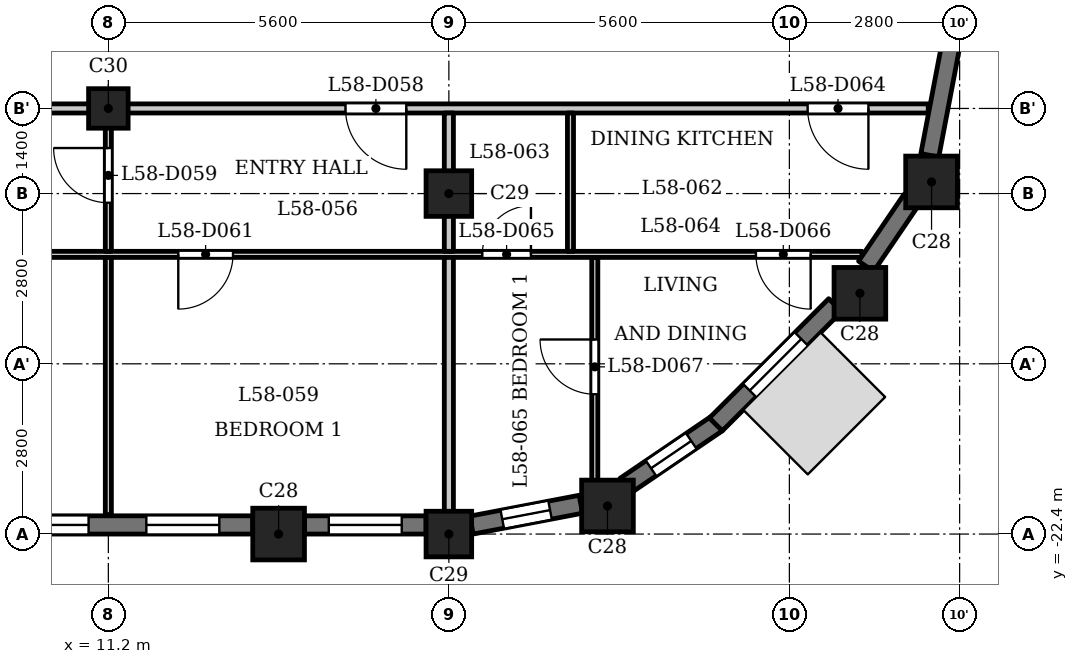
"""IFC4 building model, lengths in metres.
Left out: names, types, materials, properties, quantities, classifications, styles, units other than length and angle.
Written with IfcOpenShell. Run it as: python <this file> out.ifc"""

import sys

from ifc_helpers import new_model, si_unit, direction, frame, frame_2d, origin, origin_2d, place, context, subcontext, project, spatial, rectangle, extrude, element, fill, save


model = new_model("IFC4")
c1 = context("Model", 3, precision=1e-05, world=origin(), true_north=direction((0.0, 1.0)))
c2 = subcontext(c1, "Body", "Model", "MODEL_VIEW")
j1 = project(units=[si_unit("LENGTHUNIT", "METRE"), si_unit("PLANEANGLEUNIT", "RADIAN")], contexts=[c1])
p1 = place(None, origin())
s1 = spatial("IfcSite", under=j1, at=p1, CompositionType="ELEMENT")
p2 = place(p1, origin())
s2 = spatial("IfcBuilding", under=s1, at=p2, CompositionType="ELEMENT")
p3 = place(p2, frame((0.0, 0.0, 223.9)))
s3 = spatial("IfcBuildingStorey", under=s2, at=p3, CompositionType="ELEMENT", Elevation=223.9)
for number, where, z_axis, x_axis in (
    (1, (14.0, -22.4, 0.0), (0.0, 0.0, 1.0), (1.0, 0.0, 0.0)),
    (2, (19.409, -21.938, 0.0), (0.0, 0.0, 1.0), (1.0, 0.0, 0.0)),
    (3, (23.56, -18.44, 0.0), (0.0, 0.0, 1.0), (1.0, 0.0, 0.0)),
    (4, (24.738, -16.609, 0.0), (0.0, 0.0, 1.0), (1.0, 0.0, 0.0)),
):
    element("IfcColumn", number, at=place(p3, frame(where, z_axis=z_axis, x_axis=x_axis)), inside=s3, PredefinedType="COLUMN", context=c2, shape_type="SweptSolid", body=[
        extrude(rectangle(XDim=0.85, YDim=0.85, at=origin_2d()), origin(), (0.0, 0.0, 1.0), 3.5),
    ])
for number, where, z_axis, x_axis in (
    (5, (16.8, -22.4, 0.0), (0.0, 0.0, 1.0), (1.0, 0.0, 0.0)),
    (6, (16.8, -16.8, 0.0), (0.0, 0.0, 1.0), (1.0, 0.0, 0.0)),
):
    element("IfcColumn", number, at=place(p3, frame(where, z_axis=z_axis, x_axis=x_axis)), inside=s3, PredefinedType="COLUMN", context=c2, shape_type="SweptSolid", body=[
        extrude(rectangle(XDim=0.75, YDim=0.75, at=origin_2d()), origin(), (0.0, 0.0, 1.0), 3.5),
    ])
p4 = place(p3, frame((11.2, -15.4, 0.0), z_axis=(0.0, 0.0, 1.0), x_axis=(1.0, 0.0, 0.0)))
e7 = element("IfcColumn", 7, at=p4, inside=s3, PredefinedType="COLUMN", context=c2, shape_type="SweptSolid", body=[
    extrude(rectangle(XDim=0.65, YDim=0.65, at=origin_2d()), origin(), (0.0, 0.0, 1.0), 3.5),
])
p5 = place(p3, frame((8.825, -22.25, 0.0), z_axis=(0.0, 0.0, 1.0), x_axis=(1.0, 0.0, 0.0)))
e8 = element("IfcWall", 8, at=p5, inside=s3, PredefinedType="SOLIDWALL", context=c2, shape_type="SweptSolid", body=[
    extrude(rectangle(XDim=4.75, YDim=0.3, at=frame_2d((2.375, 0.0))), origin(), (0.0, 0.0, 1.0), 2.5),
])
p6 = place(p5, frame((0.25, 0.0, 0.9)))
e9 = element("IfcOpeningElement", 9, at=p6, cuts=e8, PredefinedType="OPENING", context=c2, shape_type="SweptSolid", body=[
    extrude(rectangle(XDim=1.8, YDim=1.25, at=frame_2d((0.9, 0.625))), frame((0.0, 0.16, 0.0), z_axis=(0.0, -1.0, 0.0), x_axis=(1.0, 0.0, 0.0)), (0.0, 0.0, 1.0), 0.32),
])
p7 = place(p5, frame((3.0, 0.0, 0.6)))
e10 = element("IfcOpeningElement", 10, at=p7, cuts=e8, PredefinedType="OPENING", context=c2, shape_type="SweptSolid", body=[
    extrude(rectangle(XDim=1.2, YDim=1.55, at=frame_2d((0.6, 0.775))), frame((0.0, 0.16, 0.0), z_axis=(0.0, -1.0, 0.0), x_axis=(1.0, 0.0, 0.0)), (0.0, 0.0, 1.0), 0.32),
])
p8 = place(p3, frame((14.425, -22.25, 0.0), z_axis=(0.0, 0.0, 1.0), x_axis=(1.0, 0.0, 0.0)))
e11 = element("IfcWall", 11, at=p8, inside=s3, PredefinedType="SOLIDWALL", context=c2, shape_type="SweptSolid", body=[
    extrude(rectangle(XDim=2.0, YDim=0.3, at=frame_2d((1.0, 0.0))), origin(), (0.0, 0.0, 1.0), 2.5),
])
p9 = place(p8, frame((0.4, 0.0, 0.6)))
e12 = element("IfcOpeningElement", 12, at=p9, cuts=e11, PredefinedType="OPENING", context=c2, shape_type="SweptSolid", body=[
    extrude(rectangle(XDim=1.2, YDim=1.55, at=frame_2d((0.6, 0.775))), frame((0.0, 0.16, 0.0), z_axis=(0.0, -1.0, 0.0), x_axis=(1.0, 0.0, 0.0)), (0.0, 0.0, 1.0), 0.32),
])
p10 = place(p3, frame((17.172, -22.253, 0.0), z_axis=(0.0, 0.0, 1.0), x_axis=(0.982300037503, 0.187314271538, 0.0)))
e13 = element("IfcWall", 13, at=p10, inside=s3, PredefinedType="SOLIDWALL", context=c2, shape_type="SweptSolid", body=[
    extrude(rectangle(XDim=1.831, YDim=0.3, at=frame_2d((0.916, 0.0))), origin(), (0.0, 0.0, 1.0), 2.5),
])
p11 = place(p10, frame((0.516, 0.0, 0.6)))
e14 = element("IfcOpeningElement", 14, at=p11, cuts=e13, PredefinedType="OPENING", context=c2, shape_type="SweptSolid", body=[
    extrude(rectangle(XDim=0.8, YDim=1.55, at=frame_2d((0.4, 0.775))), frame((0.0, 0.16, 0.0), z_axis=(0.0, -1.0, 0.0), x_axis=(1.0, 0.0, 0.0)), (0.0, 0.0, 1.0), 0.32),
])
p12 = place(p3, frame((19.698, -21.608, 0.0), z_axis=(0.0, 0.0, 1.0), x_axis=(0.82705295608, 0.562124014644, 0.0)))
e15 = element("IfcWall", 15, at=p12, inside=s3, PredefinedType="SOLIDWALL", context=c2, shape_type="SweptSolid", body=[
    extrude(rectangle(XDim=1.831, YDim=0.3, at=frame_2d((0.916, 0.0))), origin(), (0.0, 0.0, 1.0), 2.5),
])
p13 = place(p12, frame((0.516, 0.0, 0.6)))
e16 = element("IfcOpeningElement", 16, at=p13, cuts=e15, PredefinedType="OPENING", context=c2, shape_type="SweptSolid", body=[
    extrude(rectangle(XDim=0.8, YDim=1.55, at=frame_2d((0.4, 0.775))), frame((0.0, 0.16, 0.0), z_axis=(0.0, -1.0, 0.0), x_axis=(1.0, 0.0, 0.0)), (0.0, 0.0, 1.0), 0.32),
])
p14 = place(p3, frame((21.191, -20.597, 0.0), z_axis=(0.0, 0.0, 1.0), x_axis=(0.707150767798, 0.707062791838, 0.0)))
e17 = element("IfcWall", 17, at=p14, inside=s3, PredefinedType="SOLIDWALL", context=c2, shape_type="SweptSolid", body=[
    extrude(rectangle(XDim=2.775, YDim=0.3, at=frame_2d((1.388, 0.0))), origin(), (0.0, 0.0, 1.0), 2.5),
])
p15 = place(p14, frame((0.788, 0.0, 0.6)))
e18 = element("IfcOpeningElement", 18, at=p15, cuts=e17, PredefinedType="OPENING", context=c2, shape_type="SweptSolid", body=[
    extrude(rectangle(XDim=1.2, YDim=1.55, at=frame_2d((0.6, 0.775))), frame((0.0, 0.16, 0.0), z_axis=(0.0, -1.0, 0.0), x_axis=(1.0, 0.0, 0.0)), (0.0, 0.0, 1.0), 0.32),
])
p16 = place(p3, frame((23.662, -17.996, 0.0), z_axis=(0.0, 0.0, 1.0), x_axis=(0.562149004813, 0.827035970432, 0.0)))
e19 = element("IfcWall", 19, at=p16, inside=s3, PredefinedType="SOLIDWALL", context=c2, shape_type="SweptSolid", body=[
    extrude(rectangle(XDim=1.327, YDim=0.3, at=frame_2d((0.664, 0.0))), origin(), (0.0, 0.0, 1.0), 2.5),
])
p17 = place(p3, frame((24.709, -16.171, 0.0), z_axis=(0.0, 0.0, 1.0), x_axis=(0.187442908742, 0.982275499014, 0.0)))
e20 = element("IfcWall", 20, at=p17, inside=s3, PredefinedType="SOLIDWALL", context=c2, shape_type="SweptSolid", body=[
    extrude(rectangle(XDim=1.831, YDim=0.3, at=frame_2d((0.916, 0.0))), origin(), (0.0, 0.0, 1.0), 2.5),
])
p18 = place(p3, frame((-23.594, -17.8, 0.0), z_axis=(0.0, 0.0, 1.0), x_axis=(1.0, 0.0, 0.0)))
e21 = element("IfcWall", 21, at=p18, inside=s3, PredefinedType="PARTITIONING", context=c2, shape_type="SweptSolid", body=[
    extrude(rectangle(XDim=47.188, YDim=0.1, at=frame_2d((23.594, 0.0))), origin(), (0.0, 0.0, 1.0), 3.2),
])
p19 = place(p18, frame((5.094, 0.0, 0.0)))
e22 = element("IfcOpeningElement", 22, at=p19, cuts=e21, PredefinedType="OPENING", context=c2, shape_type="SweptSolid", body=[
    extrude(rectangle(XDim=0.8, YDim=2.1, at=frame_2d((0.4, 1.05))), frame((0.0, 0.06, 0.0), z_axis=(0.0, -1.0, 0.0), x_axis=(1.0, 0.0, 0.0)), (0.0, 0.0, 1.0), 0.12),
])
p20 = place(p18, frame((1.126, 0.0, 0.0)))
e23 = element("IfcOpeningElement", 23, at=p20, cuts=e21, PredefinedType="OPENING", context=c2, shape_type="SweptSolid", body=[
    extrude(rectangle(XDim=0.9, YDim=2.1, at=frame_2d((0.45, 1.05))), frame((0.0, 0.06, 0.0), z_axis=(0.0, -1.0, 0.0), x_axis=(1.0, 0.0, 0.0)), (0.0, 0.0, 1.0), 0.12),
])
p21 = place(p18, frame((9.944, 0.0, 0.0)))
e24 = element("IfcOpeningElement", 24, at=p21, cuts=e21, PredefinedType="OPENING", context=c2, shape_type="SweptSolid", body=[
    extrude(rectangle(XDim=0.8, YDim=2.1, at=frame_2d((0.4, 1.05))), frame((0.0, 0.06, 0.0), z_axis=(0.0, -1.0, 0.0), x_axis=(1.0, 0.0, 0.0)), (0.0, 0.0, 1.0), 0.12),
])
p22 = place(p18, frame((7.444, 0.0, 0.0)))
e25 = element("IfcOpeningElement", 25, at=p22, cuts=e21, PredefinedType="OPENING", context=c2, shape_type="SweptSolid", body=[
    extrude(rectangle(XDim=0.9, YDim=2.1, at=frame_2d((0.45, 1.05))), frame((0.0, 0.06, 0.0), z_axis=(0.0, -1.0, 0.0), x_axis=(1.0, 0.0, 0.0)), (0.0, 0.0, 1.0), 0.12),
])
p23 = place(p18, frame((16.544, 0.0, 0.0)))
e26 = element("IfcOpeningElement", 26, at=p23, cuts=e21, PredefinedType="OPENING", context=c2, shape_type="SweptSolid", body=[
    extrude(rectangle(XDim=0.8, YDim=2.1, at=frame_2d((0.4, 1.05))), frame((0.0, 0.06, 0.0), z_axis=(0.0, -1.0, 0.0), x_axis=(1.0, 0.0, 0.0)), (0.0, 0.0, 1.0), 0.12),
])
p24 = place(p18, frame((13.294, 0.0, 0.0)))
e27 = element("IfcOpeningElement", 27, at=p24, cuts=e21, PredefinedType="OPENING", context=c2, shape_type="SweptSolid", body=[
    extrude(rectangle(XDim=0.9, YDim=2.1, at=frame_2d((0.45, 1.05))), frame((0.0, 0.06, 0.0), z_axis=(0.0, -1.0, 0.0), x_axis=(1.0, 0.0, 0.0)), (0.0, 0.0, 1.0), 0.12),
])
p25 = place(p18, frame((21.144, 0.0, 0.0)))
e28 = element("IfcOpeningElement", 28, at=p25, cuts=e21, PredefinedType="OPENING", context=c2, shape_type="SweptSolid", body=[
    extrude(rectangle(XDim=0.8, YDim=2.1, at=frame_2d((0.4, 1.05))), frame((0.0, 0.06, 0.0), z_axis=(0.0, -1.0, 0.0), x_axis=(1.0, 0.0, 0.0)), (0.0, 0.0, 1.0), 0.12),
])
p26 = place(p18, frame((18.894, 0.0, 0.0)))
e29 = element("IfcOpeningElement", 29, at=p26, cuts=e21, PredefinedType="OPENING", context=c2, shape_type="SweptSolid", body=[
    extrude(rectangle(XDim=0.9, YDim=2.1, at=frame_2d((0.45, 1.05))), frame((0.0, 0.06, 0.0), z_axis=(0.0, -1.0, 0.0), x_axis=(1.0, 0.0, 0.0)), (0.0, 0.0, 1.0), 0.12),
])
p27 = place(p18, frame((35.944, 0.0, 0.0)))
e30 = element("IfcOpeningElement", 30, at=p27, cuts=e21, PredefinedType="OPENING", context=c2, shape_type="SweptSolid", body=[
    extrude(rectangle(XDim=0.9, YDim=2.1, at=frame_2d((0.45, 1.05))), frame((0.0, 0.06, 0.0), z_axis=(0.0, -1.0, 0.0), x_axis=(1.0, 0.0, 0.0)), (0.0, 0.0, 1.0), 0.12),
])
p28 = place(p18, frame((32.594, 0.0, 0.0)))
e31 = element("IfcOpeningElement", 31, at=p28, cuts=e21, PredefinedType="OPENING", context=c2, shape_type="SweptSolid", body=[
    extrude(rectangle(XDim=0.9, YDim=2.1, at=frame_2d((0.45, 1.05))), frame((0.0, 0.06, 0.0), z_axis=(0.0, -1.0, 0.0), x_axis=(1.0, 0.0, 0.0)), (0.0, 0.0, 1.0), 0.12),
])
p29 = place(p18, frame((40.944, 0.0, 0.0)))
e32 = element("IfcOpeningElement", 32, at=p29, cuts=e21, PredefinedType="OPENING", context=c2, shape_type="SweptSolid", body=[
    extrude(rectangle(XDim=0.8, YDim=2.1, at=frame_2d((0.4, 1.05))), frame((0.0, 0.06, 0.0), z_axis=(0.0, -1.0, 0.0), x_axis=(1.0, 0.0, 0.0)), (0.0, 0.0, 1.0), 0.12),
])
p30 = place(p18, frame((45.444, 0.0, 0.0)))
e33 = element("IfcOpeningElement", 33, at=p30, cuts=e21, PredefinedType="OPENING", context=c2, shape_type="SweptSolid", body=[
    extrude(rectangle(XDim=0.9, YDim=2.1, at=frame_2d((0.45, 1.05))), frame((0.0, 0.06, 0.0), z_axis=(0.0, -1.0, 0.0), x_axis=(1.0, 0.0, 0.0)), (0.0, 0.0, 1.0), 0.12),
])
p31 = place(p3, frame((-24.684, -15.4, 0.0), z_axis=(0.0, 0.0, 1.0), x_axis=(1.0, 0.0, 0.0)))
e34 = element("IfcWall", 34, at=p31, inside=s3, PredefinedType="PARTITIONING", context=c2, shape_type="SweptSolid", body=[
    extrude(rectangle(XDim=49.368, YDim=0.15, at=frame_2d((24.684, 0.0))), origin(), (0.0, 0.0, 1.0), 3.2),
])
p32 = place(p31, frame((1.143, 0.0, 0.0)))
e35 = element("IfcOpeningElement", 35, at=p32, cuts=e34, PredefinedType="OPENING", context=c2, shape_type="SweptSolid", body=[
    extrude(rectangle(XDim=1.0, YDim=2.1, at=frame_2d((0.5, 1.05))), frame((0.0, 0.085, 0.0), z_axis=(0.0, -1.0, 0.0), x_axis=(1.0, 0.0, 0.0)), (0.0, 0.0, 1.0), 0.17),
])
p33 = place(p31, frame((8.534, 0.0, 0.0)))
e36 = element("IfcOpeningElement", 36, at=p33, cuts=e34, PredefinedType="OPENING", context=c2, shape_type="SweptSolid", body=[
    extrude(rectangle(XDim=1.0, YDim=2.1, at=frame_2d((0.5, 1.05))), frame((0.0, 0.085, 0.0), z_axis=(0.0, -1.0, 0.0), x_axis=(1.0, 0.0, 0.0)), (0.0, 0.0, 1.0), 0.17),
])
p34 = place(p31, frame((15.384, 0.0, 0.0)))
e37 = element("IfcOpeningElement", 37, at=p34, cuts=e34, PredefinedType="OPENING", context=c2, shape_type="SweptSolid", body=[
    extrude(rectangle(XDim=1.0, YDim=2.1, at=frame_2d((0.5, 1.05))), frame((0.0, 0.085, 0.0), z_axis=(0.0, -1.0, 0.0), x_axis=(1.0, 0.0, 0.0)), (0.0, 0.0, 1.0), 0.17),
])
p35 = place(p31, frame((19.984, 0.0, 0.0)))
e38 = element("IfcOpeningElement", 38, at=p35, cuts=e34, PredefinedType="OPENING", context=c2, shape_type="SweptSolid", body=[
    extrude(rectangle(XDim=1.0, YDim=2.1, at=frame_2d((0.5, 1.05))), frame((0.0, 0.085, 0.0), z_axis=(0.0, -1.0, 0.0), x_axis=(1.0, 0.0, 0.0)), (0.0, 0.0, 1.0), 0.17),
])
p36 = place(p31, frame((39.784, 0.0, 0.0)))
e39 = element("IfcOpeningElement", 39, at=p36, cuts=e34, PredefinedType="OPENING", context=c2, shape_type="SweptSolid", body=[
    extrude(rectangle(XDim=1.0, YDim=2.1, at=frame_2d((0.5, 1.05))), frame((0.0, 0.085, 0.0), z_axis=(0.0, -1.0, 0.0), x_axis=(1.0, 0.0, 0.0)), (0.0, 0.0, 1.0), 0.17),
])
p37 = place(p31, frame((47.384, 0.0, 0.0)))
e40 = element("IfcOpeningElement", 40, at=p37, cuts=e34, PredefinedType="OPENING", context=c2, shape_type="SweptSolid", body=[
    extrude(rectangle(XDim=1.0, YDim=2.1, at=frame_2d((0.5, 1.05))), frame((0.0, 0.085, 0.0), z_axis=(0.0, -1.0, 0.0), x_axis=(1.0, 0.0, 0.0)), (0.0, 0.0, 1.0), 0.17),
])
p38 = place(p3, frame((11.2, -22.08, 0.0), z_axis=(0.0, 0.0, 1.0), x_axis=(0.0, 1.0, 0.0)))
e41 = element("IfcWall", 41, at=p38, inside=s3, PredefinedType="PARTITIONING", context=c2, shape_type="SweptSolid", body=[
    extrude(rectangle(XDim=4.23, YDim=0.1, at=frame_2d((2.115, 0.0))), origin(), (0.0, 0.0, 1.0), 3.2),
])
p39 = place(p3, frame((11.2, -17.75, 0.0), z_axis=(0.0, 0.0, 1.0), x_axis=(0.0, 1.0, 0.0)))
e42 = element("IfcWall", 42, at=p39, inside=s3, PredefinedType="PARTITIONING", context=c2, shape_type="SweptSolid", body=[
    extrude(rectangle(XDim=2.275, YDim=0.1, at=frame_2d((1.137, 0.0))), origin(), (0.0, 0.0, 1.0), 3.2),
])
p40 = place(p39, frame((0.799, 0.0, 0.0)))
e43 = element("IfcOpeningElement", 43, at=p40, cuts=e42, PredefinedType="OPENING", context=c2, shape_type="SweptSolid", body=[
    extrude(rectangle(XDim=0.9, YDim=2.1, at=frame_2d((0.45, 1.05))), frame((0.0, 0.06, 0.0), z_axis=(0.0, -1.0, 0.0), x_axis=(1.0, 0.0, 0.0)), (0.0, 0.0, 1.0), 0.12),
])
p41 = place(p3, frame((16.8, -22.31, 0.0), z_axis=(0.0, 0.0, 1.0), x_axis=(0.0, 1.0, 0.0)))
e44 = element("IfcWall", 44, at=p41, inside=s3, PredefinedType="PARTITIONING", context=c2, shape_type="SweptSolid", body=[
    extrude(rectangle(XDim=4.46, YDim=0.15, at=frame_2d((2.23, 0.0))), origin(), (0.0, 0.0, 1.0), 2.55),
])
p42 = place(p3, frame((16.8, -17.75, 0.0), z_axis=(0.0, 0.0, 1.0), x_axis=(0.0, 1.0, 0.0)))
e45 = element("IfcWall", 45, at=p42, inside=s3, PredefinedType="PARTITIONING", context=c2, shape_type="SweptSolid", body=[
    extrude(rectangle(XDim=2.275, YDim=0.15, at=frame_2d((1.137, 0.0))), origin(), (0.0, 0.0, 1.0), 2.55),
])
p43 = place(p3, frame((18.8, -17.75, 0.0), z_axis=(0.0, 0.0, 1.0), x_axis=(0.0, 1.0, 0.0)))
e46 = element("IfcWall", 46, at=p43, inside=s3, PredefinedType="PARTITIONING", context=c2, shape_type="SweptSolid", body=[
    extrude(rectangle(XDim=2.275, YDim=0.1, at=frame_2d((1.137, 0.0))), origin(), (0.0, 0.0, 1.0), 3.2),
])
p44 = place(p3, frame((19.2, -21.92, 0.0), z_axis=(0.0, 0.0, 1.0), x_axis=(0.0, 1.0, 0.0)))
e47 = element("IfcWall", 47, at=p44, inside=s3, PredefinedType="PARTITIONING", context=c2, shape_type="SweptSolid", body=[
    extrude(rectangle(XDim=4.07, YDim=0.1, at=frame_2d((2.035, 0.0))), origin(), (0.0, 0.0, 1.0), 3.2),
])
p45 = place(p44, frame((1.82, 0.0, 0.0)))
e48 = element("IfcOpeningElement", 48, at=p45, cuts=e47, PredefinedType="OPENING", context=c2, shape_type="SweptSolid", body=[
    extrude(rectangle(XDim=0.9, YDim=2.1, at=frame_2d((0.45, 1.05))), frame((0.0, 0.06, 0.0), z_axis=(0.0, -1.0, 0.0), x_axis=(1.0, 0.0, 0.0)), (0.0, 0.0, 1.0), 0.12),
])
p46 = place(p36, origin())
e49 = element("IfcDoor", 49, at=p46, inside=s3, OperationType="SINGLE_SWING_RIGHT", PredefinedType="DOOR", context=c2, shape_type="SweptSolid", body=[
    extrude(rectangle(XDim=1.0, YDim=2.1, at=frame_2d((0.5, 1.05))), frame((0.0, 0.025, 0.0), z_axis=(0.0, -1.0, 0.0), x_axis=(1.0, 0.0, 0.0)), (0.0, 0.0, 1.0), 0.05),
])
fill(e39, e49)
p47 = place(p40, origin())
e50 = element("IfcDoor", 50, at=p47, inside=s3, OperationType="SINGLE_SWING_LEFT", PredefinedType="DOOR", context=c2, shape_type="SweptSolid", body=[
    extrude(rectangle(XDim=0.9, YDim=2.1, at=frame_2d((0.45, 1.05))), frame((0.0, 0.025, 0.0), z_axis=(0.0, -1.0, 0.0), x_axis=(1.0, 0.0, 0.0)), (0.0, 0.0, 1.0), 0.05),
])
fill(e43, e50)
p48 = place(p27, origin())
e51 = element("IfcDoor", 51, at=p48, inside=s3, OperationType="SINGLE_SWING_LEFT", PredefinedType="DOOR", context=c2, shape_type="SweptSolid", body=[
    extrude(rectangle(XDim=0.9, YDim=2.1, at=frame_2d((0.45, 1.05))), frame((0.0, 0.025, 0.0), z_axis=(0.0, -1.0, 0.0), x_axis=(1.0, 0.0, 0.0)), (0.0, 0.0, 1.0), 0.05),
])
fill(e30, e51)
p49 = place(p37, origin())
e52 = element("IfcDoor", 52, at=p49, inside=s3, OperationType="SINGLE_SWING_RIGHT", PredefinedType="DOOR", context=c2, shape_type="SweptSolid", body=[
    extrude(rectangle(XDim=1.0, YDim=2.1, at=frame_2d((0.5, 1.05))), frame((0.0, 0.025, 0.0), z_axis=(0.0, -1.0, 0.0), x_axis=(1.0, 0.0, 0.0)), (0.0, 0.0, 1.0), 0.05),
])
fill(e40, e52)
p50 = place(p29, origin())
e53 = element("IfcDoor", 53, at=p50, inside=s3, OperationType="SINGLE_SWING_LEFT", PredefinedType="DOOR", context=c2, shape_type="SweptSolid", body=[
    extrude(rectangle(XDim=0.8, YDim=2.1, at=frame_2d((0.4, 1.05))), frame((0.0, 0.025, 0.0), z_axis=(0.0, -1.0, 0.0), x_axis=(1.0, 0.0, 0.0)), (0.0, 0.0, 1.0), 0.05),
])
fill(e32, e53)
p51 = place(p30, origin())
e54 = element("IfcDoor", 54, at=p51, inside=s3, OperationType="SINGLE_SWING_RIGHT", PredefinedType="DOOR", context=c2, shape_type="SweptSolid", body=[
    extrude(rectangle(XDim=0.9, YDim=2.1, at=frame_2d((0.45, 1.05))), frame((0.0, 0.025, 0.0), z_axis=(0.0, -1.0, 0.0), x_axis=(1.0, 0.0, 0.0)), (0.0, 0.0, 1.0), 0.05),
])
fill(e33, e54)
p52 = place(p45, origin())
e55 = element("IfcDoor", 55, at=p52, inside=s3, OperationType="SINGLE_SWING_LEFT", PredefinedType="DOOR", context=c2, shape_type="SweptSolid", body=[
    extrude(rectangle(XDim=0.9, YDim=2.1, at=frame_2d((0.45, 1.05))), frame((0.0, 0.025, 0.0), z_axis=(0.0, -1.0, 0.0), x_axis=(1.0, 0.0, 0.0)), (0.0, 0.0, 1.0), 0.05),
])
fill(e48, e55)
p53 = place(p6, origin())
e56 = element("IfcWindow", 56, at=p53, inside=s3, PartitioningType="SINGLE_PANEL", PredefinedType="WINDOW", context=c2, shape_type="SweptSolid", body=[
    extrude(rectangle(XDim=1.8, YDim=1.25, at=frame_2d((0.9, 0.625))), frame((0.0, 0.03, 0.0), z_axis=(0.0, -1.0, 0.0), x_axis=(1.0, 0.0, 0.0)), (0.0, 0.0, 1.0), 0.06),
])
fill(e9, e56)
p54 = place(p7, origin())
e57 = element("IfcWindow", 57, at=p54, inside=s3, PartitioningType="SINGLE_PANEL", PredefinedType="WINDOW", context=c2, shape_type="SweptSolid", body=[
    extrude(rectangle(XDim=1.2, YDim=1.55, at=frame_2d((0.6, 0.775))), frame((0.0, 0.03, 0.0), z_axis=(0.0, -1.0, 0.0), x_axis=(1.0, 0.0, 0.0)), (0.0, 0.0, 1.0), 0.06),
])
fill(e10, e57)
p55 = place(p9, origin())
e58 = element("IfcWindow", 58, at=p55, inside=s3, PartitioningType="SINGLE_PANEL", PredefinedType="WINDOW", context=c2, shape_type="SweptSolid", body=[
    extrude(rectangle(XDim=1.2, YDim=1.55, at=frame_2d((0.6, 0.775))), frame((0.0, 0.03, 0.0), z_axis=(0.0, -1.0, 0.0), x_axis=(1.0, 0.0, 0.0)), (0.0, 0.0, 1.0), 0.06),
])
fill(e12, e58)
p56 = place(p11, origin())
e59 = element("IfcWindow", 59, at=p56, inside=s3, PartitioningType="SINGLE_PANEL", PredefinedType="WINDOW", context=c2, shape_type="SweptSolid", body=[
    extrude(rectangle(XDim=0.8, YDim=1.55, at=frame_2d((0.4, 0.775))), frame((0.0, 0.03, 0.0), z_axis=(0.0, -1.0, 0.0), x_axis=(1.0, 0.0, 0.0)), (0.0, 0.0, 1.0), 0.06),
])
fill(e14, e59)
p57 = place(p13, origin())
e60 = element("IfcWindow", 60, at=p57, inside=s3, PartitioningType="SINGLE_PANEL", PredefinedType="WINDOW", context=c2, shape_type="SweptSolid", body=[
    extrude(rectangle(XDim=0.8, YDim=1.55, at=frame_2d((0.4, 0.775))), frame((0.0, 0.03, 0.0), z_axis=(0.0, -1.0, 0.0), x_axis=(1.0, 0.0, 0.0)), (0.0, 0.0, 1.0), 0.06),
])
fill(e16, e60)
p58 = place(p15, origin())
e61 = element("IfcWindow", 61, at=p58, inside=s3, PartitioningType="SINGLE_PANEL", PredefinedType="WINDOW", context=c2, shape_type="SweptSolid", body=[
    extrude(rectangle(XDim=1.2, YDim=1.55, at=frame_2d((0.6, 0.775))), frame((0.0, 0.03, 0.0), z_axis=(0.0, -1.0, 0.0), x_axis=(1.0, 0.0, 0.0)), (0.0, 0.0, 1.0), 0.06),
])
fill(e18, e61)
save(model, sys.argv[1])
